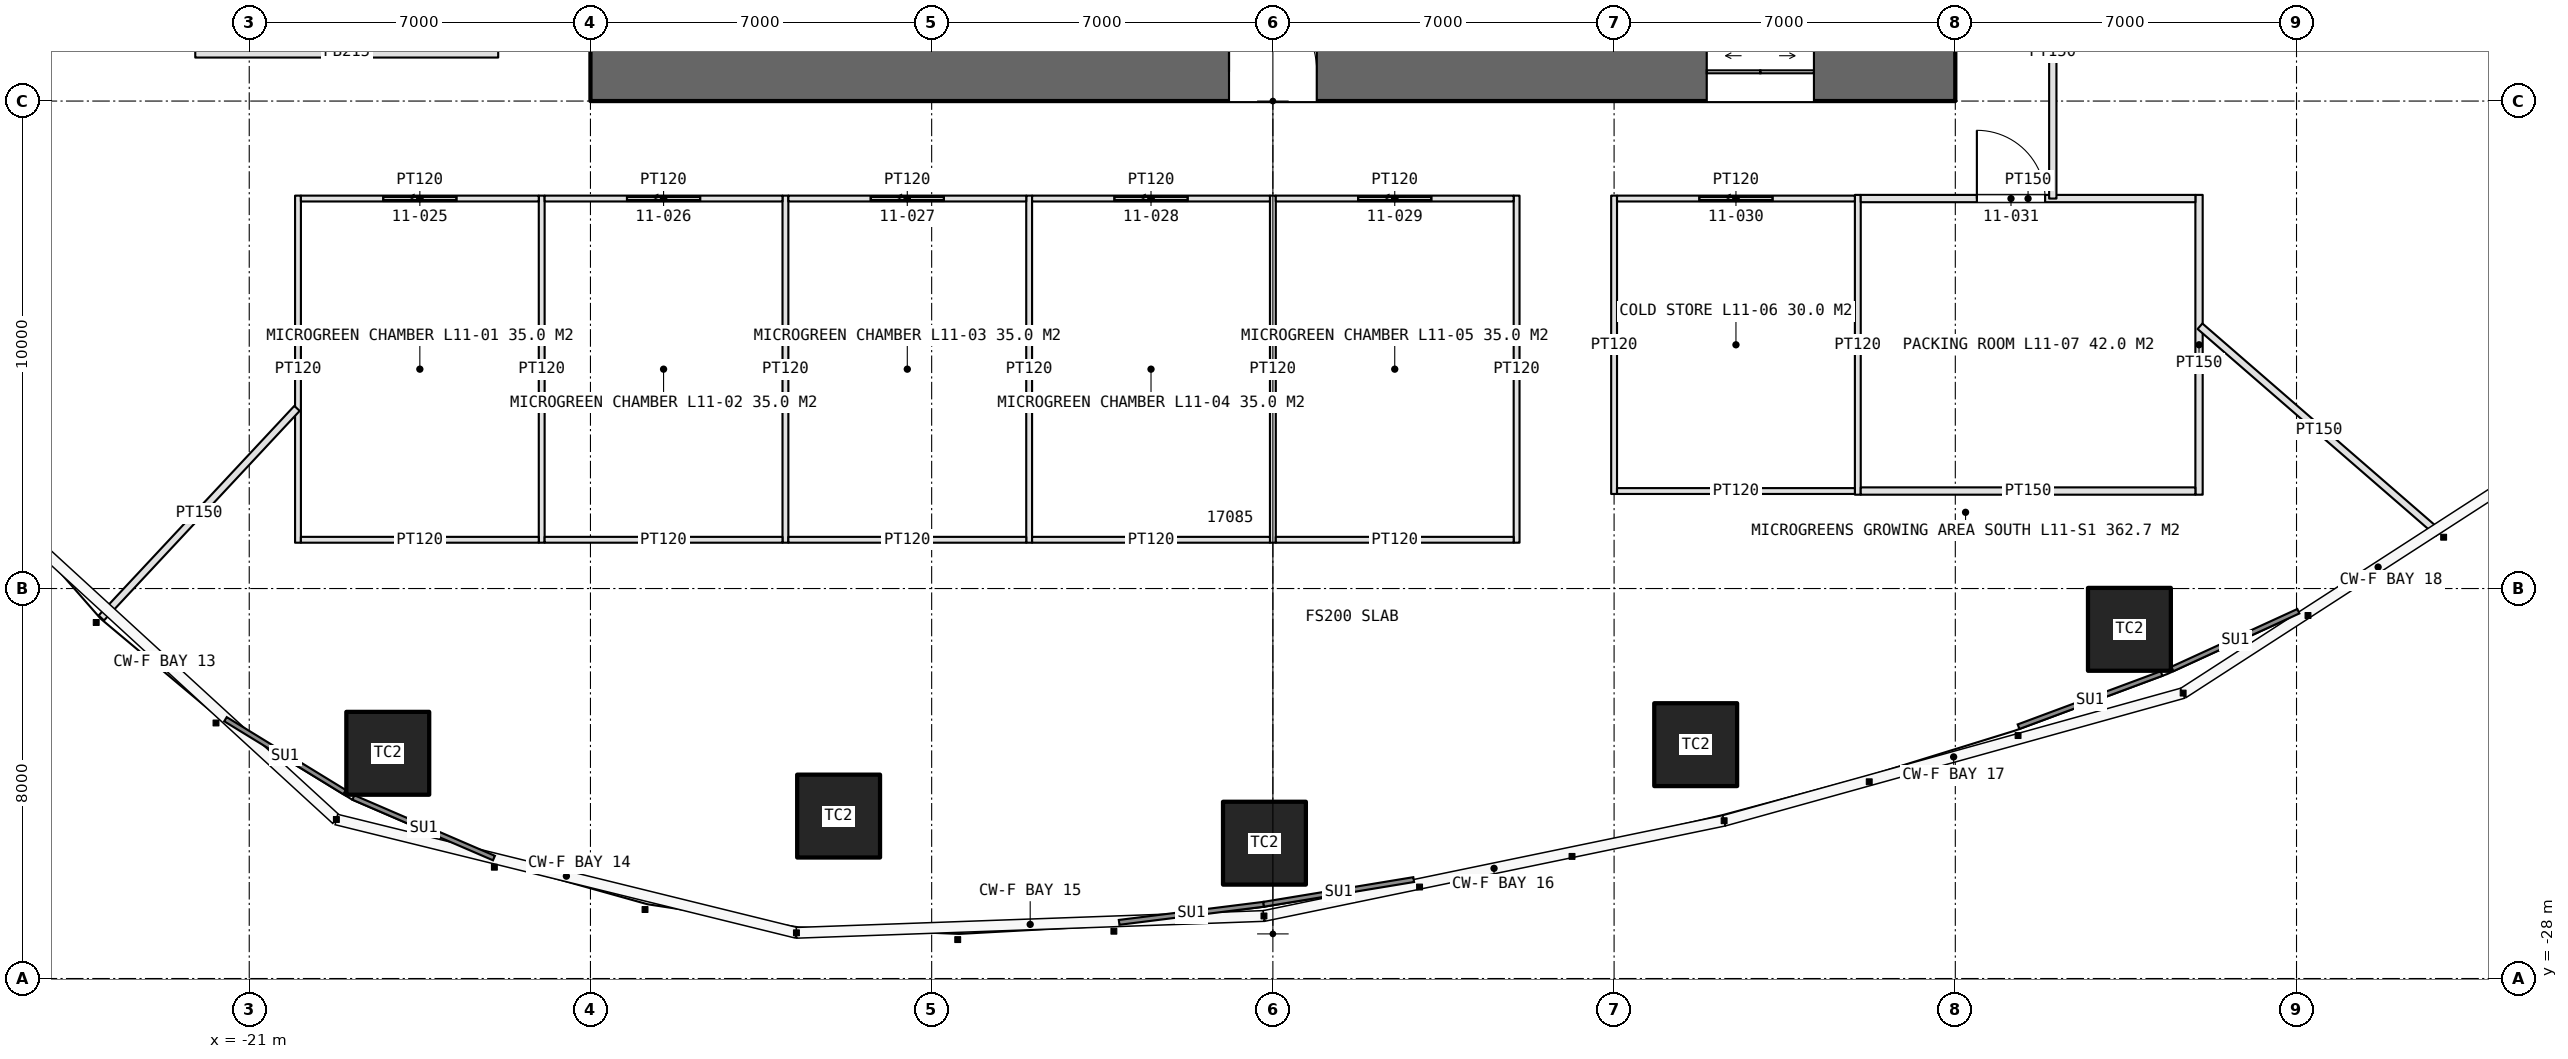
"""IFC4 building model, lengths in metres.
Left out: names, types, materials, properties, quantities, classifications, styles, units other than length and angle.
Written with IfcOpenShell. Run it as: python <this file> out.ifc"""

import sys

from ifc_helpers import new_model, si_unit, direction, frame, frame_2d, origin, origin_2d, place, context, subcontext, project, spatial, rectangle, extrude, element, fill, save


model = new_model("IFC4")
c1 = context("Model", 3, precision=1e-05, world=origin(), true_north=direction((0.0, 1.0)))
c2 = subcontext(c1, "Body", "Model", "MODEL_VIEW")
j1 = project(units=[si_unit("LENGTHUNIT", "METRE"), si_unit("PLANEANGLEUNIT", "RADIAN")], contexts=[c1])
p1 = place(None, origin())
s1 = spatial("IfcSite", under=j1, at=p1, CompositionType="ELEMENT")
p2 = place(p1, origin())
s2 = spatial("IfcBuilding", under=s1, at=p2, CompositionType="ELEMENT")
p3 = place(p2, frame((0.0, 0.0, 55.0)))
s3 = spatial("IfcBuildingStorey", under=s2, at=p3, CompositionType="ELEMENT", Elevation=55.0)
p4 = place(p3, frame((-14.0, -9.4, 0.0), z_axis=(0.0, 0.0, 1.0), x_axis=(1.0, 0.0, 0.0)))
e1 = element("IfcWall", 1, at=p4, inside=s3, PredefinedType="SHEAR", context=c2, shape_type="SweptSolid", body=[
    extrude(rectangle(XDim=28.0, YDim=1.2, at=frame_2d((14.0, 0.0))), origin(), (0.0, 0.0, 1.0), 5.0),
])
p5 = place(p4, frame((13.1, 0.0, 0.0)))
e2 = element("IfcOpeningElement", 2, at=p5, cuts=e1, PredefinedType="OPENING", context=c2, shape_type="SweptSolid", body=[
    extrude(rectangle(XDim=1.8, YDim=2.4, at=frame_2d((0.9, 1.2))), frame((0.0, 0.61, 0.0), z_axis=(0.0, -1.0, 0.0), x_axis=(1.0, 0.0, 0.0)), (0.0, 0.0, 1.0), 1.22),
])
p6 = place(p4, frame((22.9, 0.0, 0.0)))
e3 = element("IfcOpeningElement", 3, at=p6, cuts=e1, PredefinedType="OPENING", context=c2, shape_type="SweptSolid", body=[
    extrude(rectangle(XDim=2.2, YDim=2.7, at=frame_2d((1.1, 1.35))), frame((0.0, 0.61, 0.0), z_axis=(0.0, -1.0, 0.0), x_axis=(1.0, 0.0, 0.0)), (0.0, 0.0, 1.0), 1.22),
])
for number, where, z_axis, x_axis in (
    (4, (-18.158, -23.38, 0.0), (0.0, 0.0, 1.0), (1.0, 0.0, 0.0)),
    (5, (-8.909, -24.668, 0.0), (0.0, 0.0, 1.0), (1.0, 0.0, 0.0)),
    (6, (-0.173, -25.224, 0.0), (0.0, 0.0, 1.0), (1.0, 0.0, 0.0)),
    (7, (8.674, -23.203, 0.0), (0.0, 0.0, 1.0), (1.0, 0.0, 0.0)),
    (8, (17.572, -20.837, 0.0), (0.0, 0.0, 1.0), (1.0, 0.0, 0.0)),
):
    element("IfcColumn", number, at=place(p3, frame(where, z_axis=z_axis, x_axis=x_axis)), inside=s3, PredefinedType="COLUMN", context=c2, shape_type="SweptSolid", body=[
        extrude(rectangle(XDim=1.7, YDim=1.7, at=origin_2d()), origin(), (0.0, 0.0, 1.0), 5.0),
    ])
for number, where, z_axis, x_axis in (
    (9, (-20.0, -11.94, 0.0), (0.0, 0.0, 1.0), (0.0, -1.0, 0.0)),
    (10, (-15.0, -11.94, 0.0), (0.0, 0.0, 1.0), (0.0, -1.0, 0.0)),
    (11, (-10.0, -11.94, 0.0), (0.0, 0.0, 1.0), (0.0, -1.0, 0.0)),
    (12, (-5.0, -11.94, 0.0), (0.0, 0.0, 1.0), (0.0, -1.0, 0.0)),
    (13, (0.0, -11.94, 0.0), (0.0, 0.0, 1.0), (0.0, -1.0, 0.0)),
    (14, (5.0, -11.94, 0.0), (0.0, 0.0, 1.0), (0.0, -1.0, 0.0)),
):
    element("IfcWall", number, at=place(p3, frame(where, z_axis=z_axis, x_axis=x_axis)), inside=s3, PredefinedType="PARTITIONING", context=c2, shape_type="SweptSolid", body=[
        extrude(rectangle(XDim=7.12, YDim=0.12, at=frame_2d((3.56, 0.0))), origin(), (0.0, 0.0, 1.0), 3.6),
    ])
p7 = place(p3, frame((-19.94, -12.0, 0.0), z_axis=(0.0, 0.0, 1.0), x_axis=(1.0, 0.0, 0.0)))
e15 = element("IfcWall", 15, at=p7, inside=s3, PredefinedType="PARTITIONING", context=c2, shape_type="SweptSolid", body=[
    extrude(rectangle(XDim=4.88, YDim=0.12, at=frame_2d((2.44, 0.0))), origin(), (0.0, 0.0, 1.0), 3.6),
])
p8 = place(p7, frame((1.69, 0.0, 0.0)))
e16 = element("IfcOpeningElement", 16, at=p8, cuts=e15, PredefinedType="OPENING", context=c2, shape_type="SweptSolid", body=[
    extrude(rectangle(XDim=1.5, YDim=2.5, at=frame_2d((0.75, 1.25))), frame((0.0, 0.07, 0.0), z_axis=(0.0, -1.0, 0.0), x_axis=(1.0, 0.0, 0.0)), (0.0, 0.0, 1.0), 0.14),
])
p9 = place(p3, frame((-19.94, -19.0, 0.0), z_axis=(0.0, 0.0, 1.0), x_axis=(1.0, 0.0, 0.0)))
e17 = element("IfcWall", 17, at=p9, inside=s3, PredefinedType="PARTITIONING", context=c2, shape_type="SweptSolid", body=[
    extrude(rectangle(XDim=4.88, YDim=0.12, at=frame_2d((2.44, 0.0))), origin(), (0.0, 0.0, 1.0), 3.6),
])
p10 = place(p3, frame((-14.94, -12.0, 0.0), z_axis=(0.0, 0.0, 1.0), x_axis=(1.0, 0.0, 0.0)))
e18 = element("IfcWall", 18, at=p10, inside=s3, PredefinedType="PARTITIONING", context=c2, shape_type="SweptSolid", body=[
    extrude(rectangle(XDim=4.88, YDim=0.12, at=frame_2d((2.44, 0.0))), origin(), (0.0, 0.0, 1.0), 3.6),
])
p11 = place(p10, frame((1.69, 0.0, 0.0)))
e19 = element("IfcOpeningElement", 19, at=p11, cuts=e18, PredefinedType="OPENING", context=c2, shape_type="SweptSolid", body=[
    extrude(rectangle(XDim=1.5, YDim=2.5, at=frame_2d((0.75, 1.25))), frame((0.0, 0.07, 0.0), z_axis=(0.0, -1.0, 0.0), x_axis=(1.0, 0.0, 0.0)), (0.0, 0.0, 1.0), 0.14),
])
p12 = place(p3, frame((-14.94, -19.0, 0.0), z_axis=(0.0, 0.0, 1.0), x_axis=(1.0, 0.0, 0.0)))
e20 = element("IfcWall", 20, at=p12, inside=s3, PredefinedType="PARTITIONING", context=c2, shape_type="SweptSolid", body=[
    extrude(rectangle(XDim=4.88, YDim=0.12, at=frame_2d((2.44, 0.0))), origin(), (0.0, 0.0, 1.0), 3.6),
])
p13 = place(p3, frame((-9.94, -12.0, 0.0), z_axis=(0.0, 0.0, 1.0), x_axis=(1.0, 0.0, 0.0)))
e21 = element("IfcWall", 21, at=p13, inside=s3, PredefinedType="PARTITIONING", context=c2, shape_type="SweptSolid", body=[
    extrude(rectangle(XDim=4.88, YDim=0.12, at=frame_2d((2.44, 0.0))), origin(), (0.0, 0.0, 1.0), 3.6),
])
p14 = place(p13, frame((1.69, 0.0, 0.0)))
e22 = element("IfcOpeningElement", 22, at=p14, cuts=e21, PredefinedType="OPENING", context=c2, shape_type="SweptSolid", body=[
    extrude(rectangle(XDim=1.5, YDim=2.5, at=frame_2d((0.75, 1.25))), frame((0.0, 0.07, 0.0), z_axis=(0.0, -1.0, 0.0), x_axis=(1.0, 0.0, 0.0)), (0.0, 0.0, 1.0), 0.14),
])
p15 = place(p3, frame((-9.94, -19.0, 0.0), z_axis=(0.0, 0.0, 1.0), x_axis=(1.0, 0.0, 0.0)))
e23 = element("IfcWall", 23, at=p15, inside=s3, PredefinedType="PARTITIONING", context=c2, shape_type="SweptSolid", body=[
    extrude(rectangle(XDim=4.88, YDim=0.12, at=frame_2d((2.44, 0.0))), origin(), (0.0, 0.0, 1.0), 3.6),
])
p16 = place(p3, frame((-4.94, -12.0, 0.0), z_axis=(0.0, 0.0, 1.0), x_axis=(1.0, 0.0, 0.0)))
e24 = element("IfcWall", 24, at=p16, inside=s3, PredefinedType="PARTITIONING", context=c2, shape_type="SweptSolid", body=[
    extrude(rectangle(XDim=4.88, YDim=0.12, at=frame_2d((2.44, 0.0))), origin(), (0.0, 0.0, 1.0), 3.6),
])
p17 = place(p16, frame((1.69, 0.0, 0.0)))
e25 = element("IfcOpeningElement", 25, at=p17, cuts=e24, PredefinedType="OPENING", context=c2, shape_type="SweptSolid", body=[
    extrude(rectangle(XDim=1.5, YDim=2.5, at=frame_2d((0.75, 1.25))), frame((0.0, 0.07, 0.0), z_axis=(0.0, -1.0, 0.0), x_axis=(1.0, 0.0, 0.0)), (0.0, 0.0, 1.0), 0.14),
])
p18 = place(p3, frame((-4.94, -19.0, 0.0), z_axis=(0.0, 0.0, 1.0), x_axis=(1.0, 0.0, 0.0)))
e26 = element("IfcWall", 26, at=p18, inside=s3, PredefinedType="PARTITIONING", context=c2, shape_type="SweptSolid", body=[
    extrude(rectangle(XDim=4.88, YDim=0.12, at=frame_2d((2.44, 0.0))), origin(), (0.0, 0.0, 1.0), 3.6),
])
p19 = place(p3, frame((0.06, -12.0, 0.0), z_axis=(0.0, 0.0, 1.0), x_axis=(1.0, 0.0, 0.0)))
e27 = element("IfcWall", 27, at=p19, inside=s3, PredefinedType="PARTITIONING", context=c2, shape_type="SweptSolid", body=[
    extrude(rectangle(XDim=4.88, YDim=0.12, at=frame_2d((2.44, 0.0))), origin(), (0.0, 0.0, 1.0), 3.6),
])
p20 = place(p19, frame((1.69, 0.0, 0.0)))
e28 = element("IfcOpeningElement", 28, at=p20, cuts=e27, PredefinedType="OPENING", context=c2, shape_type="SweptSolid", body=[
    extrude(rectangle(XDim=1.5, YDim=2.5, at=frame_2d((0.75, 1.25))), frame((0.0, 0.07, 0.0), z_axis=(0.0, -1.0, 0.0), x_axis=(1.0, 0.0, 0.0)), (0.0, 0.0, 1.0), 0.14),
])
p21 = place(p3, frame((0.06, -19.0, 0.0), z_axis=(0.0, 0.0, 1.0), x_axis=(1.0, 0.0, 0.0)))
e29 = element("IfcWall", 29, at=p21, inside=s3, PredefinedType="PARTITIONING", context=c2, shape_type="SweptSolid", body=[
    extrude(rectangle(XDim=4.88, YDim=0.12, at=frame_2d((2.44, 0.0))), origin(), (0.0, 0.0, 1.0), 3.6),
])
p22 = place(p3, frame((7.0, -11.94, 0.0), z_axis=(0.0, 0.0, 1.0), x_axis=(0.0, -1.0, 0.0)))
e30 = element("IfcWall", 30, at=p22, inside=s3, PredefinedType="PARTITIONING", context=c2, shape_type="SweptSolid", body=[
    extrude(rectangle(XDim=6.12, YDim=0.12, at=frame_2d((3.06, 0.0))), origin(), (0.0, 0.0, 1.0), 3.6),
])
p23 = place(p3, frame((12.0, -11.925, 0.0), z_axis=(0.0, 0.0, 1.0), x_axis=(0.0, -1.0, 0.0)))
e31 = element("IfcWall", 31, at=p23, inside=s3, PredefinedType="PARTITIONING", context=c2, shape_type="SweptSolid", body=[
    extrude(rectangle(XDim=6.15, YDim=0.12, at=frame_2d((3.075, 0.0))), origin(), (0.0, 0.0, 1.0), 3.6),
])
p24 = place(p3, frame((19.0, -11.925, 0.0), z_axis=(0.0, 0.0, 1.0), x_axis=(0.0, -1.0, 0.0)))
e32 = element("IfcWall", 32, at=p24, inside=s3, PredefinedType="PARTITIONING", context=c2, shape_type="SweptSolid", body=[
    extrude(rectangle(XDim=6.15, YDim=0.15, at=frame_2d((3.075, 0.0))), origin(), (0.0, 0.0, 1.0), 3.6),
])
p25 = place(p3, frame((7.06, -12.0, 0.0), z_axis=(0.0, 0.0, 1.0), x_axis=(1.0, 0.0, 0.0)))
e33 = element("IfcWall", 33, at=p25, inside=s3, PredefinedType="PARTITIONING", context=c2, shape_type="SweptSolid", body=[
    extrude(rectangle(XDim=4.88, YDim=0.12, at=frame_2d((2.44, 0.0))), origin(), (0.0, 0.0, 1.0), 3.6),
])
p26 = place(p25, frame((1.69, 0.0, 0.0)))
e34 = element("IfcOpeningElement", 34, at=p26, cuts=e33, PredefinedType="OPENING", context=c2, shape_type="SweptSolid", body=[
    extrude(rectangle(XDim=1.5, YDim=2.5, at=frame_2d((0.75, 1.25))), frame((0.0, 0.07, 0.0), z_axis=(0.0, -1.0, 0.0), x_axis=(1.0, 0.0, 0.0)), (0.0, 0.0, 1.0), 0.14),
])
p27 = place(p3, frame((7.06, -18.0, 0.0), z_axis=(0.0, 0.0, 1.0), x_axis=(1.0, 0.0, 0.0)))
e35 = element("IfcWall", 35, at=p27, inside=s3, PredefinedType="PARTITIONING", context=c2, shape_type="SweptSolid", body=[
    extrude(rectangle(XDim=4.88, YDim=0.12, at=frame_2d((2.44, 0.0))), origin(), (0.0, 0.0, 1.0), 3.6),
])
p28 = place(p3, frame((12.06, -12.0, 0.0), z_axis=(0.0, 0.0, 1.0), x_axis=(1.0, 0.0, 0.0)))
e36 = element("IfcWall", 36, at=p28, inside=s3, PredefinedType="PARTITIONING", context=c2, shape_type="SweptSolid", body=[
    extrude(rectangle(XDim=6.865, YDim=0.15, at=frame_2d((3.433, 0.0))), origin(), (0.0, 0.0, 1.0), 3.6),
])
p29 = place(p28, frame((2.383, 0.0, 0.0)))
e37 = element("IfcOpeningElement", 37, at=p29, cuts=e36, PredefinedType="OPENING", context=c2, shape_type="SweptSolid", body=[
    extrude(rectangle(XDim=1.4, YDim=2.4, at=frame_2d((0.7, 1.2))), frame((0.0, 0.085, 0.0), z_axis=(0.0, -1.0, 0.0), x_axis=(1.0, 0.0, 0.0)), (0.0, 0.0, 1.0), 0.17),
])
p30 = place(p3, frame((12.06, -18.0, 0.0), z_axis=(0.0, 0.0, 1.0), x_axis=(1.0, 0.0, 0.0)))
e38 = element("IfcWall", 38, at=p30, inside=s3, PredefinedType="PARTITIONING", context=c2, shape_type="SweptSolid", body=[
    extrude(rectangle(XDim=6.865, YDim=0.15, at=frame_2d((3.433, 0.0))), origin(), (0.0, 0.0, 1.0), 3.6),
])
p31 = place(p3, frame((-15.893, -9.0, 0.0), z_axis=(0.0, 0.0, 1.0), x_axis=(-1.0, 0.0, 0.0)))
e39 = element("IfcWall", 39, at=p31, inside=s3, PredefinedType="PARTITIONING", context=c2, shape_type="SweptSolid", body=[
    extrude(rectangle(XDim=6.215, YDim=0.215, at=frame_2d((3.107, 0.0))), origin(), (0.0, 0.0, 1.0), 3.6),
])
p32 = place(p3, frame((-20.02, -16.305, 0.0), z_axis=(0.0, 0.0, 1.0), x_axis=(-0.682516386928, -0.730870290527, 0.0)))
e40 = element("IfcWall", 40, at=p32, inside=s3, PredefinedType="PARTITIONING", context=c2, shape_type="SweptSolid", body=[
    extrude(rectangle(XDim=5.882, YDim=0.15, at=frame_2d((2.941, 0.0))), origin(), (0.0, 0.0, 1.0), 3.6),
])
p33 = place(p3, frame((19.02, -14.619, 0.0), z_axis=(0.0, 0.0, 1.0), x_axis=(0.755435065004, -0.65522352107, 0.0)))
e41 = element("IfcWall", 41, at=p33, inside=s3, PredefinedType="PARTITIONING", context=c2, shape_type="SweptSolid", body=[
    extrude(rectangle(XDim=6.471, YDim=0.15, at=frame_2d((3.235, 0.0))), origin(), (0.0, 0.0, 1.0), 3.6),
])
p34 = place(p3, frame((16.0, -12.0, 0.0), z_axis=(0.0, 0.0, 1.0), x_axis=(0.0, 1.0, 0.0)))
e42 = element("IfcWall", 42, at=p34, inside=s3, PredefinedType="PARTITIONING", context=c2, shape_type="SweptSolid", body=[
    extrude(rectangle(XDim=6.0, YDim=0.15, at=frame_2d((3.0, 0.0))), origin(), (0.0, 0.0, 1.0), 3.6),
])
p35 = place(p34, frame((3.9, 0.0, 0.0)))
e43 = element("IfcOpeningElement", 43, at=p35, cuts=e42, PredefinedType="OPENING", context=c2, shape_type="SweptSolid", body=[
    extrude(rectangle(XDim=1.6, YDim=2.4, at=frame_2d((0.8, 1.2))), frame((0.0, 0.085, 0.0), z_axis=(0.0, -1.0, 0.0), x_axis=(1.0, 0.0, 0.0)), (0.0, 0.0, 1.0), 0.17),
])
p36 = place(p5, origin())
e44 = element("IfcDoor", 44, at=p36, inside=s3, OperationType="DOUBLE_DOOR_SINGLE_SWING", PredefinedType="DOOR", context=c2, shape_type="SweptSolid", body=[
    extrude(rectangle(XDim=1.8, YDim=2.4, at=frame_2d((0.9, 1.2))), frame((0.0, 0.025, 0.0), z_axis=(0.0, -1.0, 0.0), x_axis=(1.0, 0.0, 0.0)), (0.0, 0.0, 1.0), 0.05),
])
fill(e2, e44)
p37 = place(p6, origin())
e45 = element("IfcDoor", 45, at=p37, inside=s3, OperationType="DOUBLE_DOOR_SLIDING", PredefinedType="DOOR", context=c2, shape_type="SweptSolid", body=[
    extrude(rectangle(XDim=2.2, YDim=2.7, at=frame_2d((1.1, 1.35))), frame((0.0, 0.025, 0.0), z_axis=(0.0, -1.0, 0.0), x_axis=(1.0, 0.0, 0.0)), (0.0, 0.0, 1.0), 0.05),
])
fill(e3, e45)
p38 = place(p8, origin())
e46 = element("IfcDoor", 46, at=p38, inside=s3, OperationType="SLIDING_TO_LEFT", PredefinedType="DOOR", context=c2, shape_type="SweptSolid", body=[
    extrude(rectangle(XDim=1.5, YDim=2.5, at=frame_2d((0.75, 1.25))), frame((0.0, 0.025, 0.0), z_axis=(0.0, -1.0, 0.0), x_axis=(1.0, 0.0, 0.0)), (0.0, 0.0, 1.0), 0.05),
])
fill(e16, e46)
p39 = place(p11, origin())
e47 = element("IfcDoor", 47, at=p39, inside=s3, OperationType="SLIDING_TO_LEFT", PredefinedType="DOOR", context=c2, shape_type="SweptSolid", body=[
    extrude(rectangle(XDim=1.5, YDim=2.5, at=frame_2d((0.75, 1.25))), frame((0.0, 0.025, 0.0), z_axis=(0.0, -1.0, 0.0), x_axis=(1.0, 0.0, 0.0)), (0.0, 0.0, 1.0), 0.05),
])
fill(e19, e47)
p40 = place(p14, origin())
e48 = element("IfcDoor", 48, at=p40, inside=s3, OperationType="SLIDING_TO_LEFT", PredefinedType="DOOR", context=c2, shape_type="SweptSolid", body=[
    extrude(rectangle(XDim=1.5, YDim=2.5, at=frame_2d((0.75, 1.25))), frame((0.0, 0.025, 0.0), z_axis=(0.0, -1.0, 0.0), x_axis=(1.0, 0.0, 0.0)), (0.0, 0.0, 1.0), 0.05),
])
fill(e22, e48)
p41 = place(p17, origin())
e49 = element("IfcDoor", 49, at=p41, inside=s3, OperationType="SLIDING_TO_LEFT", PredefinedType="DOOR", context=c2, shape_type="SweptSolid", body=[
    extrude(rectangle(XDim=1.5, YDim=2.5, at=frame_2d((0.75, 1.25))), frame((0.0, 0.025, 0.0), z_axis=(0.0, -1.0, 0.0), x_axis=(1.0, 0.0, 0.0)), (0.0, 0.0, 1.0), 0.05),
])
fill(e25, e49)
p42 = place(p20, origin())
e50 = element("IfcDoor", 50, at=p42, inside=s3, OperationType="SLIDING_TO_LEFT", PredefinedType="DOOR", context=c2, shape_type="SweptSolid", body=[
    extrude(rectangle(XDim=1.5, YDim=2.5, at=frame_2d((0.75, 1.25))), frame((0.0, 0.025, 0.0), z_axis=(0.0, -1.0, 0.0), x_axis=(1.0, 0.0, 0.0)), (0.0, 0.0, 1.0), 0.05),
])
fill(e28, e50)
p43 = place(p26, origin())
e51 = element("IfcDoor", 51, at=p43, inside=s3, OperationType="SLIDING_TO_LEFT", PredefinedType="DOOR", context=c2, shape_type="SweptSolid", body=[
    extrude(rectangle(XDim=1.5, YDim=2.5, at=frame_2d((0.75, 1.25))), frame((0.0, 0.025, 0.0), z_axis=(0.0, -1.0, 0.0), x_axis=(1.0, 0.0, 0.0)), (0.0, 0.0, 1.0), 0.05),
])
fill(e34, e51)
p44 = place(p29, origin())
e52 = element("IfcDoor", 52, at=p44, inside=s3, OperationType="DOUBLE_DOOR_DOUBLE_SWING", PredefinedType="DOOR", context=c2, shape_type="SweptSolid", body=[
    extrude(rectangle(XDim=1.4, YDim=2.4, at=frame_2d((0.7, 1.2))), frame((0.0, 0.025, 0.0), z_axis=(0.0, -1.0, 0.0), x_axis=(1.0, 0.0, 0.0)), (0.0, 0.0, 1.0), 0.05),
])
fill(e37, e52)
save(model, sys.argv[1])
